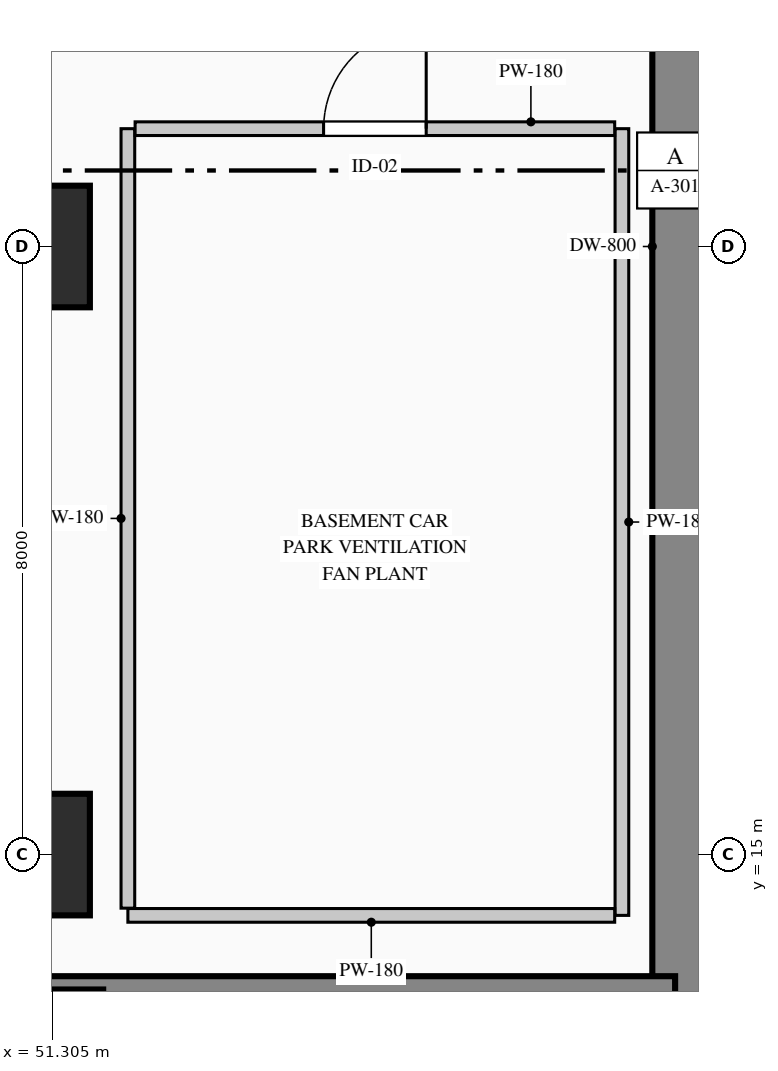
"""IFC4 building model, lengths in metres.
Left out: names, types, materials, properties, quantities, classifications, styles, units other than length and angle.
Written with IfcOpenShell. Run it as: python <this file> out.ifc"""

import sys

from ifc_helpers import new_model, si_unit, direction, frame, frame_2d, origin, origin_2d, place, context, subcontext, project, spatial, rectangle, extrude, element, fill, save


model = new_model("IFC4")
c1 = context("Model", 3, precision=1e-05, world=origin(), true_north=direction((0.0, 1.0)))
c2 = subcontext(c1, "Body", "Model", "MODEL_VIEW")
j1 = project(units=[si_unit("LENGTHUNIT", "METRE"), si_unit("PLANEANGLEUNIT", "RADIAN")], contexts=[c1])
p1 = place(None, origin())
s1 = spatial("IfcSite", under=j1, at=p1, CompositionType="ELEMENT")
p2 = place(p1, origin())
s2 = spatial("IfcBuilding", under=s1, at=p2, CompositionType="ELEMENT")
p3 = place(p2, frame((0.0, 0.0, -4.5)))
s3 = spatial("IfcBuildingStorey", under=s2, at=p3, CompositionType="ELEMENT", Elevation=-4.5)
p4 = place(p3, frame((59.6, 0.8, 0.0), z_axis=(0.0, 0.0, 1.0), x_axis=(0.0, 1.0, 0.0)))
e1 = element("IfcWall", 1, at=p4, inside=s3, PredefinedType="USERDEFINED", context=c2, shape_type="SweptSolid", body=[
    extrude(rectangle(XDim=44.4, YDim=0.8, at=frame_2d((22.2, 0.0))), origin(), (0.0, 0.0, 1.0), 4.5),
])
for number, where, z_axis, x_axis in (
    (2, (51.0, 15.0, 0.0), (0.0, 0.0, 1.0), (1.0, 0.0, 0.0)),
    (3, (51.0, 23.0, 0.0), (0.0, 0.0, 1.0), (1.0, 0.0, 0.0)),
):
    element("IfcColumn", number, at=place(p3, frame(where, z_axis=z_axis, x_axis=x_axis)), inside=s3, PredefinedType="COLUMN", context=c2, shape_type="SweptSolid", body=[
        extrude(rectangle(XDim=1.6, YDim=1.6, at=origin_2d()), origin(), (0.0, 0.0, 1.0), 4.5),
    ])
p5 = place(p3, frame((51.6, 12.85, 0.0), z_axis=(0.0, 0.0, 1.0), x_axis=(1.0, 0.0, 0.0)))
e4 = element("IfcColumn", 4, at=p5, inside=s3, PredefinedType="COLUMN", context=c2, shape_type="SweptSolid", body=[
    extrude(rectangle(XDim=0.75, YDim=0.75, at=origin_2d()), origin(), (0.0, 0.0, 1.0), 4.2),
])
p6 = place(p3, frame((35.2, 13.25, 0.0), z_axis=(0.0, 0.0, 1.0), x_axis=(1.0, 0.0, 0.0)))
e5 = element("IfcWall", 5, at=p6, inside=s3, PredefinedType="SOLIDWALL", context=c2, shape_type="SweptSolid", body=[
    extrude(rectangle(XDim=24.3, YDim=0.3, at=frame_2d((12.15, 0.0))), origin(), (0.0, 0.0, 1.0), 4.5),
])
p7 = place(p3, frame((58.8, 24.55, 0.0), z_axis=(0.0, 0.0, 1.0), x_axis=(0.0, -1.0, 0.0)))
e6 = element("IfcWall", 6, at=p7, inside=s3, PredefinedType="PARTITIONING", context=c2, shape_type="SweptSolid", body=[
    extrude(rectangle(XDim=10.35, YDim=0.18, at=frame_2d((5.175, 0.0))), origin(), (0.0, 0.0, 1.0), 4.165),
])
p8 = place(p3, frame((58.705, 14.2, 0.0), z_axis=(0.0, 0.0, 1.0), x_axis=(-1.0, 0.0, 0.0)))
e7 = element("IfcWall", 7, at=p8, inside=s3, PredefinedType="PARTITIONING", context=c2, shape_type="SweptSolid", body=[
    extrude(rectangle(XDim=6.405, YDim=0.18, at=frame_2d((3.203, 0.0))), origin(), (0.0, 0.0, 1.0), 4.165),
])
p9 = place(p3, frame((52.3, 14.295, 0.0), z_axis=(0.0, 0.0, 1.0), x_axis=(0.0, 1.0, 0.0)))
e8 = element("IfcWall", 8, at=p9, inside=s3, PredefinedType="PARTITIONING", context=c2, shape_type="SweptSolid", body=[
    extrude(rectangle(XDim=10.255, YDim=0.18, at=frame_2d((5.127, 0.0))), origin(), (0.0, 0.0, 1.0), 4.165),
])
p10 = place(p3, frame((52.395, 24.55, 0.0), z_axis=(0.0, 0.0, 1.0), x_axis=(1.0, 0.0, 0.0)))
e9 = element("IfcWall", 9, at=p10, inside=s3, PredefinedType="PARTITIONING", context=c2, shape_type="SweptSolid", body=[
    extrude(rectangle(XDim=6.31, YDim=0.18, at=frame_2d((3.155, 0.0))), origin(), (0.0, 0.0, 1.0), 4.165),
])
p11 = place(p10, frame((2.48, 0.0, 0.0)))
e10 = element("IfcOpeningElement", 10, at=p11, cuts=e9, PredefinedType="OPENING", context=c2, shape_type="SweptSolid", body=[
    extrude(rectangle(XDim=1.35, YDim=2.2, at=frame_2d((0.675, 1.1))), frame((0.0, 0.1, 0.0), z_axis=(0.0, -1.0, 0.0), x_axis=(1.0, 0.0, 0.0)), (0.0, 0.0, 1.0), 0.2),
])
p12 = place(p11, origin())
e11 = element("IfcDoor", 11, at=p12, inside=s3, OperationType="SINGLE_SWING_RIGHT", PredefinedType="DOOR", context=c2, shape_type="SweptSolid", body=[
    extrude(rectangle(XDim=1.35, YDim=2.2, at=frame_2d((0.675, 1.1))), frame((0.0, 0.025, 0.0), z_axis=(0.0, -1.0, 0.0), x_axis=(1.0, 0.0, 0.0)), (0.0, 0.0, 1.0), 0.05),
])
fill(e10, e11)
save(model, sys.argv[1])
